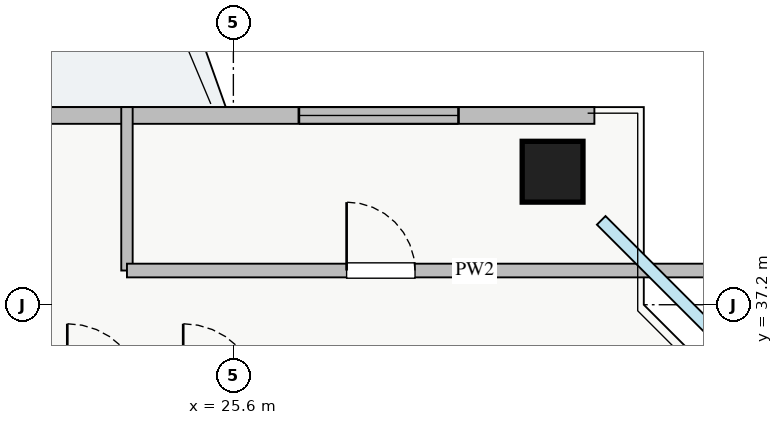
"""IFC4 building model, lengths in metres.
Left out: names, types, materials, properties, quantities, classifications, styles, units other than length and angle.
Written with IfcOpenShell. Run it as: python <this file> out.ifc"""

import sys

from ifc_helpers import new_model, si_unit, direction, frame, frame_2d, origin, origin_2d, place, context, subcontext, project, spatial, rectangle, extrude, source, transform, mapped, element, fill, save


model = new_model("IFC4")
c1 = context("Model", 3, precision=1e-05, world=origin(), true_north=direction((0.0, 1.0)))
c2 = subcontext(c1, "Body", "Model", "MODEL_VIEW")
j1 = project(units=[si_unit("LENGTHUNIT", "METRE"), si_unit("PLANEANGLEUNIT", "RADIAN")], contexts=[c1])
p1 = place(None, origin())
s1 = spatial("IfcSite", under=j1, at=p1, CompositionType="ELEMENT")
p2 = place(p1, origin())
s2 = spatial("IfcBuilding", under=s1, at=p2, CompositionType="ELEMENT")
p3 = place(p2, frame((0.0, 0.0, 193.75)))
s3 = spatial("IfcBuildingStorey", under=s2, at=p3, CompositionType="ELEMENT", Elevation=193.75)
m1 = source(origin(), c2, "Body", "SweptSolid", [
    extrude(rectangle(XDim=0.8, YDim=0.8, at=origin_2d()), origin(), (0.0, 0.0, 1.0), 3.25),
])
p4 = place(p3, frame((29.8, 38.95, 0.0), z_axis=(0.0, 0.0, 1.0), x_axis=(1.0, 0.0, 0.0)))
e1 = element("IfcColumn", 1, at=p4, inside=s3, PredefinedType="COLUMN", context=c2, shape_type="MappedRepresentation", body=[
    mapped(m1, transform((0.0, 0.0, 0.0), x_axis=(1.0, 0.0, 0.0), y_axis=(0.0, 1.0, 0.0), z_axis=(0.0, 0.0, 1.0), scale=1.0)),
])
p5 = place(p3, frame((7.65, 39.69, 0.0), z_axis=(0.0, 0.0, 1.0), x_axis=(1.0, 0.0, 0.0)))
e2 = element("IfcWall", 2, at=p5, inside=s3, PredefinedType="STANDARD", context=c2, shape_type="SweptSolid", body=[
    extrude(rectangle(XDim=22.7, YDim=0.22, at=frame_2d((11.35, 0.0))), origin(), (0.0, 0.0, 1.0), 2.61),
])
p6 = place(p5, frame((12.2, 0.0, 0.0)))
e3 = element("IfcOpeningElement", 3, at=p6, cuts=e2, PredefinedType="OPENING", context=c2, shape_type="SweptSolid", body=[
    extrude(rectangle(XDim=1.2, YDim=2.1, at=frame_2d((0.6, 1.05))), frame((0.0, 0.12, 0.0), z_axis=(0.0, -1.0, 0.0), x_axis=(1.0, 0.0, 0.0)), (0.0, 0.0, 1.0), 0.24),
])
p7 = place(p5, frame((1.637, 0.0, 0.9)))
e4 = element("IfcOpeningElement", 4, at=p7, cuts=e2, PredefinedType="OPENING", context=c2, shape_type="SweptSolid", body=[
    extrude(rectangle(XDim=2.4, YDim=1.48, at=frame_2d((1.2, 0.74))), frame((0.0, 0.12, 0.0), z_axis=(0.0, -1.0, 0.0), x_axis=(1.0, 0.0, 0.0)), (0.0, 0.0, 1.0), 0.24),
])
p8 = place(p5, frame((7.612, 0.0, 0.9)))
e5 = element("IfcOpeningElement", 5, at=p8, cuts=e2, PredefinedType="OPENING", context=c2, shape_type="SweptSolid", body=[
    extrude(rectangle(XDim=1.8, YDim=1.45, at=frame_2d((0.9, 0.725))), frame((0.0, 0.12, 0.0), z_axis=(0.0, -1.0, 0.0), x_axis=(1.0, 0.0, 0.0)), (0.0, 0.0, 1.0), 0.24),
])
p9 = place(p5, frame((18.812, 0.0, 0.9)))
e6 = element("IfcOpeningElement", 6, at=p9, cuts=e2, PredefinedType="OPENING", context=c2, shape_type="SweptSolid", body=[
    extrude(rectangle(XDim=2.1, YDim=1.48, at=frame_2d((1.05, 0.74))), frame((0.0, 0.12, 0.0), z_axis=(0.0, -1.0, 0.0), x_axis=(1.0, 0.0, 0.0)), (0.0, 0.0, 1.0), 0.24),
])
p10 = place(p3, frame((24.2, 37.65, 0.0), z_axis=(0.0, 0.0, 1.0), x_axis=(0.0, 1.0, 0.0)))
e7 = element("IfcWall", 7, at=p10, inside=s3, PredefinedType="PARTITIONING", context=c2, shape_type="SweptSolid", body=[
    extrude(rectangle(XDim=2.15, YDim=0.15, at=frame_2d((1.075, 0.0))), origin(), (0.0, 0.0, 1.0), 3.07),
])
p11 = place(p3, frame((24.2, 37.65, 0.0), z_axis=(0.0, 0.0, 1.0), x_axis=(1.0, 0.0, 0.0)))
e8 = element("IfcWall", 8, at=p11, inside=s3, PredefinedType="PARTITIONING", context=c2, shape_type="SweptSolid", body=[
    extrude(rectangle(XDim=8.25, YDim=0.18, at=frame_2d((4.125, 0.0))), origin(), (0.0, 0.0, 1.0), 3.07),
])
p12 = place(p11, frame((2.89, 0.0, 0.0)))
e9 = element("IfcOpeningElement", 9, at=p12, cuts=e8, PredefinedType="OPENING", context=c2, shape_type="SweptSolid", body=[
    extrude(rectangle(XDim=0.9, YDim=2.05, at=frame_2d((0.45, 1.025))), frame((0.0, 0.1, 0.0), z_axis=(0.0, -1.0, 0.0), x_axis=(1.0, 0.0, 0.0)), (0.0, 0.0, 1.0), 0.2),
])
m2 = source(origin(), c2, "Body", "SweptSolid", [
    extrude(rectangle(XDim=2.1, YDim=1.48, at=frame_2d((1.05, 0.74))), frame((0.0, 0.03, 0.0), z_axis=(0.0, -1.0, 0.0), x_axis=(1.0, 0.0, 0.0)), (0.0, 0.0, 1.0), 0.06),
])
p13 = place(p9, origin())
e10 = element("IfcWindow", 10, at=p13, inside=s3, PartitioningType="TRIPLE_PANEL_VERTICAL", PredefinedType="WINDOW", context=c2, shape_type="MappedRepresentation", body=[
    mapped(m2, transform((0.0, 0.0, 0.0), x_axis=(1.0, 0.0, 0.0), y_axis=(0.0, 1.0, 0.0), z_axis=(0.0, 0.0, 1.0), scale=1.0)),
])
fill(e6, e10)
m3 = source(origin(), c2, "Body", "SweptSolid", [
    extrude(rectangle(XDim=0.9, YDim=2.05, at=frame_2d((0.45, 1.025))), frame((0.0, 0.025, 0.0), z_axis=(0.0, -1.0, 0.0), x_axis=(1.0, 0.0, 0.0)), (0.0, 0.0, 1.0), 0.05),
])
p14 = place(p12, origin())
e11 = element("IfcDoor", 11, at=p14, inside=s3, OperationType="SINGLE_SWING_LEFT", PredefinedType="DOOR", context=c2, shape_type="MappedRepresentation", body=[
    mapped(m3, transform((0.0, 0.0, 0.0), x_axis=(1.0, 0.0, 0.0), y_axis=(0.0, 1.0, 0.0), z_axis=(0.0, 0.0, 1.0), scale=1.0)),
])
fill(e9, e11)
save(model, sys.argv[1])
